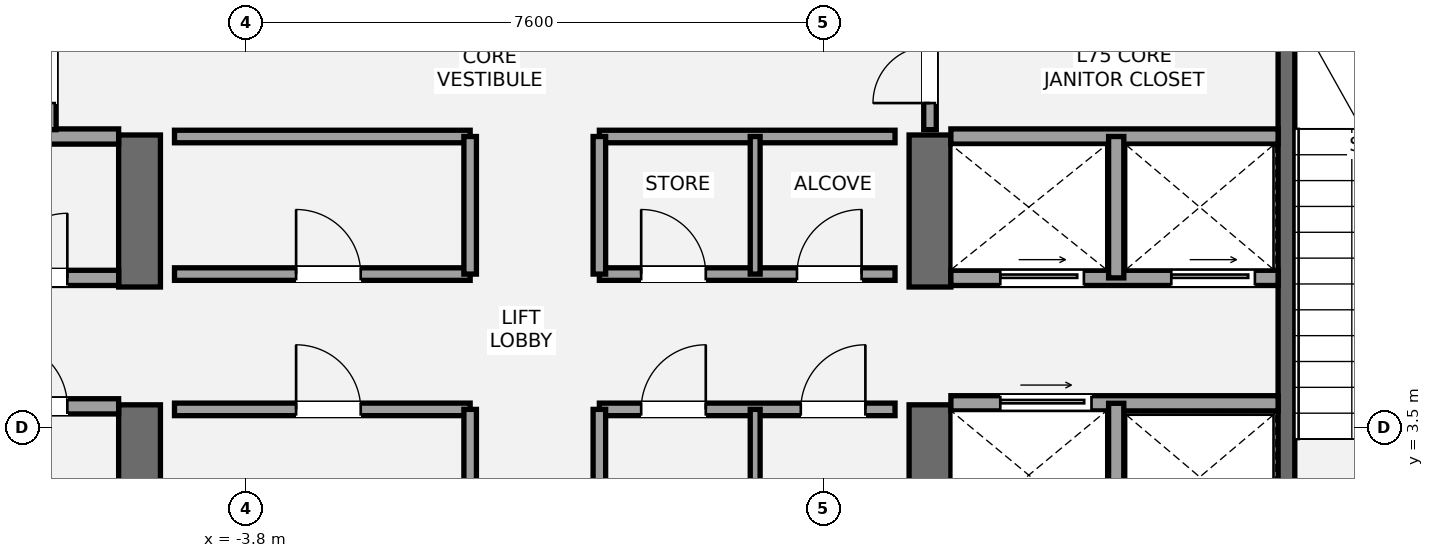
"""IFC4 building model, lengths in metres.
Left out: names, types, materials, properties, quantities, classifications, styles, units other than length and angle.
Written with IfcOpenShell. Run it as: python <this file> out.ifc"""

import sys

from ifc_helpers import new_model, si_unit, direction, frame, frame_2d, origin, place, context, subcontext, project, spatial, rectangle, extrude, element, fill, save


model = new_model("IFC4")
c1 = context("Model", 3, precision=1e-05, world=origin(), true_north=direction((0.0, 1.0)))
c2 = subcontext(c1, "Body", "Model", "MODEL_VIEW")
j1 = project(units=[si_unit("LENGTHUNIT", "METRE"), si_unit("PLANEANGLEUNIT", "RADIAN")], contexts=[c1])
p1 = place(None, origin())
s1 = spatial("IfcSite", under=j1, at=p1, CompositionType="ELEMENT")
p2 = place(p1, origin())
s2 = spatial("IfcBuilding", under=s1, at=p2, CompositionType="ELEMENT")
p3 = place(p2, frame((0.0, 0.0, 264.8)))
s3 = spatial("IfcBuildingStorey", under=s2, at=p3, CompositionType="ELEMENT", Elevation=264.8)
p4 = place(p3, frame((-5.2, 1.3, 0.0), z_axis=(0.0, 0.0, 1.0), x_axis=(0.0, 1.0, 0.0)))
e1 = element("IfcWall", 1, at=p4, inside=s3, PredefinedType="SHEAR", context=c2, shape_type="SweptSolid", body=[
    extrude(rectangle(XDim=2.5, YDim=0.55, at=frame_2d((1.25, 0.0))), origin(), (0.0, 0.0, 1.0), 4.4),
])
p5 = place(p3, frame((-5.2, 5.35, 0.0), z_axis=(0.0, 0.0, 1.0), x_axis=(0.0, 1.0, 0.0)))
e2 = element("IfcWall", 2, at=p5, inside=s3, PredefinedType="SHEAR", context=c2, shape_type="SweptSolid", body=[
    extrude(rectangle(XDim=2.0, YDim=0.55, at=frame_2d((1.0, 0.0))), origin(), (0.0, 0.0, 1.0), 4.4),
])
p6 = place(p3, frame((5.2, 1.3, 0.0), z_axis=(0.0, 0.0, 1.0), x_axis=(0.0, 1.0, 0.0)))
e3 = element("IfcWall", 3, at=p6, inside=s3, PredefinedType="SHEAR", context=c2, shape_type="SweptSolid", body=[
    extrude(rectangle(XDim=2.5, YDim=0.55, at=frame_2d((1.25, 0.0))), origin(), (0.0, 0.0, 1.0), 4.4),
])
p7 = place(p3, frame((5.2, 5.35, 0.0), z_axis=(0.0, 0.0, 1.0), x_axis=(0.0, 1.0, 0.0)))
e4 = element("IfcWall", 4, at=p7, inside=s3, PredefinedType="SHEAR", context=c2, shape_type="SweptSolid", body=[
    extrude(rectangle(XDim=2.0, YDim=0.55, at=frame_2d((1.0, 0.0))), origin(), (0.0, 0.0, 1.0), 4.4),
])
p8 = place(p3, frame((9.89, 1.85, 0.0), z_axis=(0.0, 0.0, 1.0), x_axis=(0.0, 1.0, 0.0)))
e5 = element("IfcWall", 5, at=p8, inside=s3, PredefinedType="SHEAR", context=c2, shape_type="SweptSolid", body=[
    extrude(rectangle(XDim=7.15, YDim=0.22, at=frame_2d((3.575, 0.0))), origin(), (0.0, 0.0, 1.0), 4.4),
])
p9 = place(p3, frame((-9.78, 3.78, 0.0), z_axis=(0.0, 0.0, 1.0), x_axis=(1.0, 0.0, 0.0)))
e6 = element("IfcWall", 6, at=p9, inside=s3, PredefinedType="SOLIDWALL", context=c2, shape_type="SweptSolid", body=[
    extrude(rectangle(XDim=4.305, YDim=0.2, at=frame_2d((2.152, 0.0))), origin(), (0.0, 0.0, 1.0), 4.2),
])
p10 = place(p9, frame((2.78, 0.0, 0.0)))
e7 = element("IfcOpeningElement", 7, at=p10, cuts=e6, PredefinedType="OPENING", context=c2, shape_type="SweptSolid", body=[
    extrude(rectangle(XDim=0.85, YDim=2.1, at=frame_2d((0.425, 1.05))), frame((0.0, 0.11, 0.0), z_axis=(0.0, -1.0, 0.0), x_axis=(1.0, 0.0, 0.0)), (0.0, 0.0, 1.0), 0.22),
])
p11 = place(p3, frame((-9.78, 5.47, 0.0), z_axis=(0.0, 0.0, 1.0), x_axis=(1.0, 0.0, 0.0)))
e8 = element("IfcWall", 8, at=p11, inside=s3, PredefinedType="SOLIDWALL", context=c2, shape_type="SweptSolid", body=[
    extrude(rectangle(XDim=4.305, YDim=0.2, at=frame_2d((2.152, 0.0))), origin(), (0.0, 0.0, 1.0), 4.2),
])
p12 = place(p11, frame((2.78, 0.0, 0.0)))
e9 = element("IfcOpeningElement", 9, at=p12, cuts=e8, PredefinedType="OPENING", context=c2, shape_type="SweptSolid", body=[
    extrude(rectangle(XDim=0.85, YDim=2.1, at=frame_2d((0.425, 1.05))), frame((0.0, 0.11, 0.0), z_axis=(0.0, -1.0, 0.0), x_axis=(1.0, 0.0, 0.0)), (0.0, 0.0, 1.0), 0.22),
])
p13 = place(p3, frame((-9.78, 7.33, 0.0), z_axis=(0.0, 0.0, 1.0), x_axis=(1.0, 0.0, 0.0)))
e10 = element("IfcWall", 10, at=p13, inside=s3, PredefinedType="SOLIDWALL", context=c2, shape_type="SweptSolid", body=[
    extrude(rectangle(XDim=4.305, YDim=0.2, at=frame_2d((2.152, 0.0))), origin(), (0.0, 0.0, 1.0), 4.2),
])
p14 = place(p3, frame((5.475, 3.82, 0.0), z_axis=(0.0, 0.0, 1.0), x_axis=(1.0, 0.0, 0.0)))
e11 = element("IfcWall", 11, at=p14, inside=s3, PredefinedType="SOLIDWALL", context=c2, shape_type="SweptSolid", body=[
    extrude(rectangle(XDim=4.305, YDim=0.2, at=frame_2d((2.152, 0.0))), origin(), (0.0, 0.0, 1.0), 4.2),
])
p15 = place(p14, frame((0.65, 0.0, 0.0)))
e12 = element("IfcOpeningElement", 12, at=p15, cuts=e11, PredefinedType="OPENING", context=c2, shape_type="SweptSolid", body=[
    extrude(rectangle(XDim=1.2, YDim=2.2, at=frame_2d((0.6, 1.1))), frame((0.0, 0.11, 0.0), z_axis=(0.0, -1.0, 0.0), x_axis=(1.0, 0.0, 0.0)), (0.0, 0.0, 1.0), 0.22),
])
p16 = place(p3, frame((7.65, 1.85, 0.0), z_axis=(0.0, 0.0, 1.0), x_axis=(0.0, 1.0, 0.0)))
e13 = element("IfcWall", 13, at=p16, inside=s3, PredefinedType="SOLIDWALL", context=c2, shape_type="SweptSolid", body=[
    extrude(rectangle(XDim=1.97, YDim=0.2, at=frame_2d((0.985, 0.0))), origin(), (0.0, 0.0, 1.0), 4.2),
])
p17 = place(p3, frame((5.475, 5.47, 0.0), z_axis=(0.0, 0.0, 1.0), x_axis=(1.0, 0.0, 0.0)))
e14 = element("IfcWall", 14, at=p17, inside=s3, PredefinedType="SOLIDWALL", context=c2, shape_type="SweptSolid", body=[
    extrude(rectangle(XDim=4.305, YDim=0.2, at=frame_2d((2.152, 0.0))), origin(), (0.0, 0.0, 1.0), 4.2),
])
p18 = place(p17, frame((0.65, 0.0, 0.0)))
e15 = element("IfcOpeningElement", 15, at=p18, cuts=e14, PredefinedType="OPENING", context=c2, shape_type="SweptSolid", body=[
    extrude(rectangle(XDim=1.1, YDim=2.2, at=frame_2d((0.55, 1.1))), frame((0.0, 0.11, 0.0), z_axis=(0.0, -1.0, 0.0), x_axis=(1.0, 0.0, 0.0)), (0.0, 0.0, 1.0), 0.22),
])
p19 = place(p17, frame((2.9, 0.0, 0.0)))
e16 = element("IfcOpeningElement", 16, at=p19, cuts=e14, PredefinedType="OPENING", context=c2, shape_type="SweptSolid", body=[
    extrude(rectangle(XDim=1.1, YDim=2.2, at=frame_2d((0.55, 1.1))), frame((0.0, 0.11, 0.0), z_axis=(0.0, -1.0, 0.0), x_axis=(1.0, 0.0, 0.0)), (0.0, 0.0, 1.0), 0.22),
])
p20 = place(p3, frame((5.475, 7.33, 0.0), z_axis=(0.0, 0.0, 1.0), x_axis=(1.0, 0.0, 0.0)))
e17 = element("IfcWall", 17, at=p20, inside=s3, PredefinedType="SOLIDWALL", context=c2, shape_type="SweptSolid", body=[
    extrude(rectangle(XDim=4.305, YDim=0.2, at=frame_2d((2.152, 0.0))), origin(), (0.0, 0.0, 1.0), 4.2),
])
p21 = place(p3, frame((7.65, 5.47, 0.0), z_axis=(0.0, 0.0, 1.0), x_axis=(0.0, 1.0, 0.0)))
e18 = element("IfcWall", 18, at=p21, inside=s3, PredefinedType="SOLIDWALL", context=c2, shape_type="SweptSolid", body=[
    extrude(rectangle(XDim=1.86, YDim=0.2, at=frame_2d((0.93, 0.0))), origin(), (0.0, 0.0, 1.0), 4.2),
])
p22 = place(p3, frame((-4.74, 3.74, 0.0), z_axis=(0.0, 0.0, 1.0), x_axis=(1.0, 0.0, 0.0)))
e19 = element("IfcWall", 19, at=p22, inside=s3, PredefinedType="PARTITIONING", context=c2, shape_type="SweptSolid", body=[
    extrude(rectangle(XDim=3.89, YDim=0.165, at=frame_2d((1.945, 0.0))), origin(), (0.0, 0.0, 1.0), 4.2),
])
p23 = place(p22, frame((1.6, 0.0, 0.0)))
e20 = element("IfcOpeningElement", 20, at=p23, cuts=e19, PredefinedType="OPENING", context=c2, shape_type="SweptSolid", body=[
    extrude(rectangle(XDim=0.85, YDim=2.1, at=frame_2d((0.425, 1.05))), frame((0.0, 0.093, 0.0), z_axis=(0.0, -1.0, 0.0), x_axis=(1.0, 0.0, 0.0)), (0.0, 0.0, 1.0), 0.185),
])
p24 = place(p3, frame((-0.85, 1.92, 0.0), z_axis=(0.0, 0.0, 1.0), x_axis=(0.0, 1.0, 0.0)))
e21 = element("IfcWall", 21, at=p24, inside=s3, PredefinedType="PARTITIONING", context=c2, shape_type="SweptSolid", body=[
    extrude(rectangle(XDim=1.82, YDim=0.165, at=frame_2d((0.91, 0.0))), origin(), (0.0, 0.0, 1.0), 4.2),
])
p25 = place(p3, frame((0.85, 3.74, 0.0), z_axis=(0.0, 0.0, 1.0), x_axis=(1.0, 0.0, 0.0)))
e22 = element("IfcWall", 22, at=p25, inside=s3, PredefinedType="PARTITIONING", context=c2, shape_type="SweptSolid", body=[
    extrude(rectangle(XDim=3.89, YDim=0.165, at=frame_2d((1.945, 0.0))), origin(), (0.0, 0.0, 1.0), 4.2),
])
p26 = place(p25, frame((0.55, 0.0, 0.0)))
e23 = element("IfcOpeningElement", 23, at=p26, cuts=e22, PredefinedType="OPENING", context=c2, shape_type="SweptSolid", body=[
    extrude(rectangle(XDim=0.85, YDim=2.1, at=frame_2d((0.425, 1.05))), frame((0.0, 0.093, 0.0), z_axis=(0.0, -1.0, 0.0), x_axis=(1.0, 0.0, 0.0)), (0.0, 0.0, 1.0), 0.185),
])
p27 = place(p25, frame((2.65, 0.0, 0.0)))
e24 = element("IfcOpeningElement", 24, at=p27, cuts=e22, PredefinedType="OPENING", context=c2, shape_type="SweptSolid", body=[
    extrude(rectangle(XDim=0.85, YDim=2.1, at=frame_2d((0.425, 1.05))), frame((0.0, 0.093, 0.0), z_axis=(0.0, -1.0, 0.0), x_axis=(1.0, 0.0, 0.0)), (0.0, 0.0, 1.0), 0.185),
])
p28 = place(p3, frame((0.85, 1.92, 0.0), z_axis=(0.0, 0.0, 1.0), x_axis=(0.0, 1.0, 0.0)))
e25 = element("IfcWall", 25, at=p28, inside=s3, PredefinedType="PARTITIONING", context=c2, shape_type="SweptSolid", body=[
    extrude(rectangle(XDim=1.82, YDim=0.165, at=frame_2d((0.91, 0.0))), origin(), (0.0, 0.0, 1.0), 4.2),
])
p29 = place(p3, frame((2.9, 1.92, 0.0), z_axis=(0.0, 0.0, 1.0), x_axis=(0.0, 1.0, 0.0)))
e26 = element("IfcWall", 26, at=p29, inside=s3, PredefinedType="PARTITIONING", context=c2, shape_type="SweptSolid", body=[
    extrude(rectangle(XDim=1.82, YDim=0.13, at=frame_2d((0.91, 0.0))), origin(), (0.0, 0.0, 1.0), 4.2),
])
p30 = place(p3, frame((-4.74, 5.52, 0.0), z_axis=(0.0, 0.0, 1.0), x_axis=(1.0, 0.0, 0.0)))
e27 = element("IfcWall", 27, at=p30, inside=s3, PredefinedType="PARTITIONING", context=c2, shape_type="SweptSolid", body=[
    extrude(rectangle(XDim=3.89, YDim=0.165, at=frame_2d((1.945, 0.0))), origin(), (0.0, 0.0, 1.0), 4.2),
])
p31 = place(p30, frame((1.6, 0.0, 0.0)))
e28 = element("IfcOpeningElement", 28, at=p31, cuts=e27, PredefinedType="OPENING", context=c2, shape_type="SweptSolid", body=[
    extrude(rectangle(XDim=0.85, YDim=2.1, at=frame_2d((0.425, 1.05))), frame((0.0, 0.093, 0.0), z_axis=(0.0, -1.0, 0.0), x_axis=(1.0, 0.0, 0.0)), (0.0, 0.0, 1.0), 0.185),
])
p32 = place(p3, frame((-4.74, 7.33, 0.0), z_axis=(0.0, 0.0, 1.0), x_axis=(1.0, 0.0, 0.0)))
e29 = element("IfcWall", 29, at=p32, inside=s3, PredefinedType="PARTITIONING", context=c2, shape_type="SweptSolid", body=[
    extrude(rectangle(XDim=3.89, YDim=0.165, at=frame_2d((1.945, 0.0))), origin(), (0.0, 0.0, 1.0), 4.2),
])
p33 = place(p3, frame((-0.85, 5.52, 0.0), z_axis=(0.0, 0.0, 1.0), x_axis=(0.0, 1.0, 0.0)))
e30 = element("IfcWall", 30, at=p33, inside=s3, PredefinedType="PARTITIONING", context=c2, shape_type="SweptSolid", body=[
    extrude(rectangle(XDim=1.81, YDim=0.165, at=frame_2d((0.905, 0.0))), origin(), (0.0, 0.0, 1.0), 4.2),
])
p34 = place(p3, frame((0.85, 5.52, 0.0), z_axis=(0.0, 0.0, 1.0), x_axis=(1.0, 0.0, 0.0)))
e31 = element("IfcWall", 31, at=p34, inside=s3, PredefinedType="PARTITIONING", context=c2, shape_type="SweptSolid", body=[
    extrude(rectangle(XDim=3.89, YDim=0.165, at=frame_2d((1.945, 0.0))), origin(), (0.0, 0.0, 1.0), 4.2),
])
p35 = place(p34, frame((0.55, 0.0, 0.0)))
e32 = element("IfcOpeningElement", 32, at=p35, cuts=e31, PredefinedType="OPENING", context=c2, shape_type="SweptSolid", body=[
    extrude(rectangle(XDim=0.85, YDim=2.1, at=frame_2d((0.425, 1.05))), frame((0.0, 0.093, 0.0), z_axis=(0.0, -1.0, 0.0), x_axis=(1.0, 0.0, 0.0)), (0.0, 0.0, 1.0), 0.185),
])
p36 = place(p34, frame((2.6, 0.0, 0.0)))
e33 = element("IfcOpeningElement", 33, at=p36, cuts=e31, PredefinedType="OPENING", context=c2, shape_type="SweptSolid", body=[
    extrude(rectangle(XDim=0.85, YDim=2.1, at=frame_2d((0.425, 1.05))), frame((0.0, 0.093, 0.0), z_axis=(0.0, -1.0, 0.0), x_axis=(1.0, 0.0, 0.0)), (0.0, 0.0, 1.0), 0.185),
])
p37 = place(p3, frame((0.85, 7.33, 0.0), z_axis=(0.0, 0.0, 1.0), x_axis=(1.0, 0.0, 0.0)))
e34 = element("IfcWall", 34, at=p37, inside=s3, PredefinedType="PARTITIONING", context=c2, shape_type="SweptSolid", body=[
    extrude(rectangle(XDim=3.89, YDim=0.165, at=frame_2d((1.945, 0.0))), origin(), (0.0, 0.0, 1.0), 4.2),
])
p38 = place(p3, frame((0.85, 5.52, 0.0), z_axis=(0.0, 0.0, 1.0), x_axis=(0.0, 1.0, 0.0)))
e35 = element("IfcWall", 35, at=p38, inside=s3, PredefinedType="PARTITIONING", context=c2, shape_type="SweptSolid", body=[
    extrude(rectangle(XDim=1.81, YDim=0.165, at=frame_2d((0.905, 0.0))), origin(), (0.0, 0.0, 1.0), 4.2),
])
p39 = place(p3, frame((2.9, 5.52, 0.0), z_axis=(0.0, 0.0, 1.0), x_axis=(0.0, 1.0, 0.0)))
e36 = element("IfcWall", 36, at=p39, inside=s3, PredefinedType="PARTITIONING", context=c2, shape_type="SweptSolid", body=[
    extrude(rectangle(XDim=1.81, YDim=0.13, at=frame_2d((0.905, 0.0))), origin(), (0.0, 0.0, 1.0), 4.2),
])
p40 = place(p3, frame((-6.38, 7.42, 0.0), z_axis=(0.0, 0.0, 1.0), x_axis=(0.0, 1.0, 0.0)))
e37 = element("IfcWall", 37, at=p40, inside=s3, PredefinedType="PARTITIONING", context=c2, shape_type="SweptSolid", body=[
    extrude(rectangle(XDim=1.58, YDim=0.165, at=frame_2d((0.79, 0.0))), origin(), (0.0, 0.0, 1.0), 4.2),
])
p41 = place(p40, frame((0.35, 0.0, 0.0)))
e38 = element("IfcOpeningElement", 38, at=p41, cuts=e37, PredefinedType="OPENING", context=c2, shape_type="SweptSolid", body=[
    extrude(rectangle(XDim=0.75, YDim=2.1, at=frame_2d((0.375, 1.05))), frame((0.0, 0.093, 0.0), z_axis=(0.0, -1.0, 0.0), x_axis=(1.0, 0.0, 0.0)), (0.0, 0.0, 1.0), 0.185),
])
p42 = place(p3, frame((5.2, 7.42, 0.0), z_axis=(0.0, 0.0, 1.0), x_axis=(0.0, 1.0, 0.0)))
e39 = element("IfcWall", 39, at=p42, inside=s3, PredefinedType="PARTITIONING", context=c2, shape_type="SweptSolid", body=[
    extrude(rectangle(XDim=1.58, YDim=0.165, at=frame_2d((0.79, 0.0))), origin(), (0.0, 0.0, 1.0), 4.2),
])
p43 = place(p42, frame((0.35, 0.0, 0.0)))
e40 = element("IfcOpeningElement", 40, at=p43, cuts=e39, PredefinedType="OPENING", context=c2, shape_type="SweptSolid", body=[
    extrude(rectangle(XDim=0.75, YDim=2.1, at=frame_2d((0.375, 1.05))), frame((0.0, 0.093, 0.0), z_axis=(0.0, -1.0, 0.0), x_axis=(1.0, 0.0, 0.0)), (0.0, 0.0, 1.0), 0.185),
])
p44 = place(p12, origin())
e41 = element("IfcDoor", 41, at=p44, inside=s3, OperationType="SINGLE_SWING_RIGHT", PredefinedType="DOOR", context=c2, shape_type="SweptSolid", body=[
    extrude(rectangle(XDim=0.85, YDim=2.1, at=frame_2d((0.425, 1.05))), frame((0.0, 0.025, 0.0), z_axis=(0.0, -1.0, 0.0), x_axis=(1.0, 0.0, 0.0)), (0.0, 0.0, 1.0), 0.05),
])
fill(e9, e41)
p45 = place(p10, origin())
e42 = element("IfcDoor", 42, at=p45, inside=s3, OperationType="SINGLE_SWING_LEFT", PredefinedType="DOOR", context=c2, shape_type="SweptSolid", body=[
    extrude(rectangle(XDim=0.85, YDim=2.1, at=frame_2d((0.425, 1.05))), frame((0.0, 0.025, 0.0), z_axis=(0.0, -1.0, 0.0), x_axis=(1.0, 0.0, 0.0)), (0.0, 0.0, 1.0), 0.05),
])
fill(e7, e42)
p46 = place(p15, origin())
e43 = element("IfcDoor", 43, at=p46, inside=s3, OperationType="SLIDING_TO_RIGHT", PredefinedType="DOOR", context=c2, shape_type="SweptSolid", body=[
    extrude(rectangle(XDim=1.2, YDim=2.2, at=frame_2d((0.6, 1.1))), frame((0.0, 0.025, 0.0), z_axis=(0.0, -1.0, 0.0), x_axis=(1.0, 0.0, 0.0)), (0.0, 0.0, 1.0), 0.05),
])
fill(e12, e43)
p47 = place(p18, origin())
e44 = element("IfcDoor", 44, at=p47, inside=s3, OperationType="SLIDING_TO_LEFT", PredefinedType="DOOR", context=c2, shape_type="SweptSolid", body=[
    extrude(rectangle(XDim=1.1, YDim=2.2, at=frame_2d((0.55, 1.1))), frame((0.0, 0.025, 0.0), z_axis=(0.0, -1.0, 0.0), x_axis=(1.0, 0.0, 0.0)), (0.0, 0.0, 1.0), 0.05),
])
fill(e15, e44)
p48 = place(p19, origin())
e45 = element("IfcDoor", 45, at=p48, inside=s3, OperationType="SLIDING_TO_LEFT", PredefinedType="DOOR", context=c2, shape_type="SweptSolid", body=[
    extrude(rectangle(XDim=1.1, YDim=2.2, at=frame_2d((0.55, 1.1))), frame((0.0, 0.025, 0.0), z_axis=(0.0, -1.0, 0.0), x_axis=(1.0, 0.0, 0.0)), (0.0, 0.0, 1.0), 0.05),
])
fill(e16, e45)
p49 = place(p23, origin())
e46 = element("IfcDoor", 46, at=p49, inside=s3, OperationType="SINGLE_SWING_LEFT", PredefinedType="DOOR", context=c2, shape_type="SweptSolid", body=[
    extrude(rectangle(XDim=0.85, YDim=2.1, at=frame_2d((0.425, 1.05))), frame((0.0, 0.025, 0.0), z_axis=(0.0, -1.0, 0.0), x_axis=(1.0, 0.0, 0.0)), (0.0, 0.0, 1.0), 0.05),
])
fill(e20, e46)
p50 = place(p26, origin())
e47 = element("IfcDoor", 47, at=p50, inside=s3, OperationType="SINGLE_SWING_RIGHT", PredefinedType="DOOR", context=c2, shape_type="SweptSolid", body=[
    extrude(rectangle(XDim=0.85, YDim=2.1, at=frame_2d((0.425, 1.05))), frame((0.0, 0.025, 0.0), z_axis=(0.0, -1.0, 0.0), x_axis=(1.0, 0.0, 0.0)), (0.0, 0.0, 1.0), 0.05),
])
fill(e23, e47)
p51 = place(p27, origin())
e48 = element("IfcDoor", 48, at=p51, inside=s3, OperationType="SINGLE_SWING_RIGHT", PredefinedType="DOOR", context=c2, shape_type="SweptSolid", body=[
    extrude(rectangle(XDim=0.85, YDim=2.1, at=frame_2d((0.425, 1.05))), frame((0.0, 0.025, 0.0), z_axis=(0.0, -1.0, 0.0), x_axis=(1.0, 0.0, 0.0)), (0.0, 0.0, 1.0), 0.05),
])
fill(e24, e48)
p52 = place(p31, origin())
e49 = element("IfcDoor", 49, at=p52, inside=s3, OperationType="SINGLE_SWING_LEFT", PredefinedType="DOOR", context=c2, shape_type="SweptSolid", body=[
    extrude(rectangle(XDim=0.85, YDim=2.1, at=frame_2d((0.425, 1.05))), frame((0.0, 0.025, 0.0), z_axis=(0.0, -1.0, 0.0), x_axis=(1.0, 0.0, 0.0)), (0.0, 0.0, 1.0), 0.05),
])
fill(e28, e49)
p53 = place(p35, origin())
e50 = element("IfcDoor", 50, at=p53, inside=s3, OperationType="SINGLE_SWING_LEFT", PredefinedType="DOOR", context=c2, shape_type="SweptSolid", body=[
    extrude(rectangle(XDim=0.85, YDim=2.1, at=frame_2d((0.425, 1.05))), frame((0.0, 0.025, 0.0), z_axis=(0.0, -1.0, 0.0), x_axis=(1.0, 0.0, 0.0)), (0.0, 0.0, 1.0), 0.05),
])
fill(e32, e50)
p54 = place(p36, origin())
e51 = element("IfcDoor", 51, at=p54, inside=s3, OperationType="SINGLE_SWING_RIGHT", PredefinedType="DOOR", context=c2, shape_type="SweptSolid", body=[
    extrude(rectangle(XDim=0.85, YDim=2.1, at=frame_2d((0.425, 1.05))), frame((0.0, 0.025, 0.0), z_axis=(0.0, -1.0, 0.0), x_axis=(1.0, 0.0, 0.0)), (0.0, 0.0, 1.0), 0.05),
])
fill(e33, e51)
p55 = place(p43, origin())
e52 = element("IfcDoor", 52, at=p55, inside=s3, OperationType="SINGLE_SWING_LEFT", PredefinedType="DOOR", context=c2, shape_type="SweptSolid", body=[
    extrude(rectangle(XDim=0.75, YDim=2.1, at=frame_2d((0.375, 1.05))), frame((0.0, 0.025, 0.0), z_axis=(0.0, -1.0, 0.0), x_axis=(1.0, 0.0, 0.0)), (0.0, 0.0, 1.0), 0.05),
])
fill(e40, e52)
save(model, sys.argv[1])
